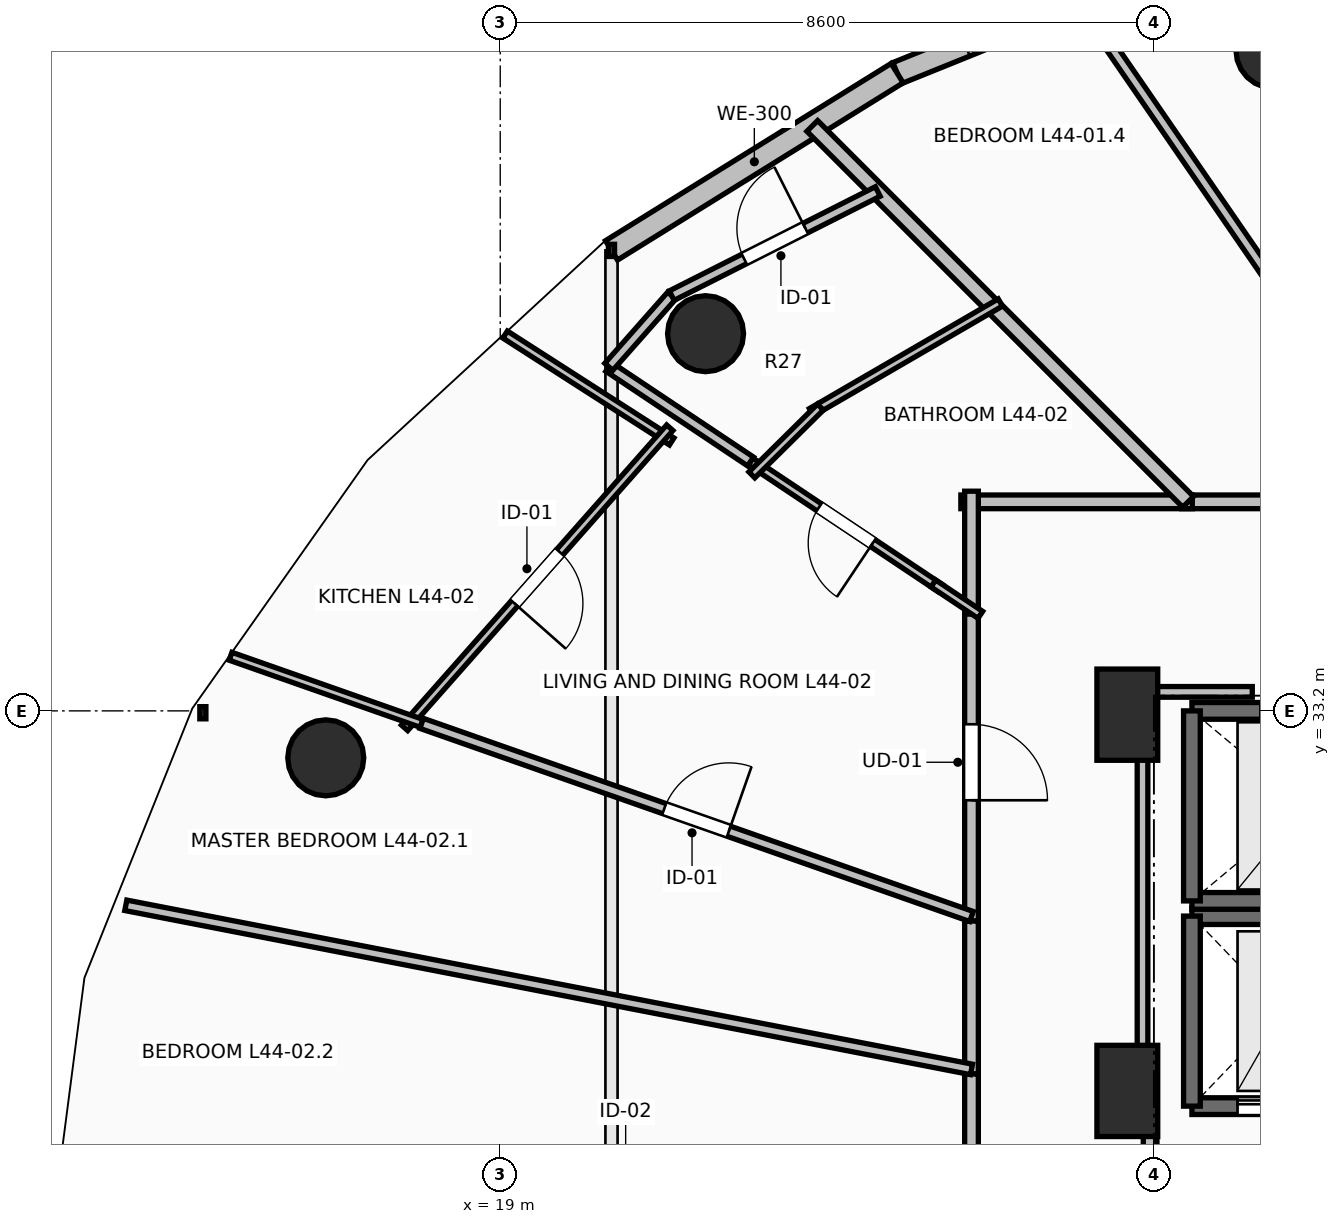
"""IFC4 building model, lengths in metres.
Left out: names, types, materials, properties, quantities, classifications, styles, units other than length and angle.
Written with IfcOpenShell. Run it as: python <this file> out.ifc"""

import sys

from ifc_helpers import new_model, si_unit, direction, frame, frame_2d, origin, origin_2d, place, context, subcontext, project, spatial, rectangle, circle, extrude, element, fill, save


model = new_model("IFC4")
c1 = context("Model", 3, precision=1e-05, world=origin(), true_north=direction((0.0, 1.0)))
c2 = subcontext(c1, "Body", "Model", "MODEL_VIEW")
j1 = project(units=[si_unit("LENGTHUNIT", "METRE"), si_unit("PLANEANGLEUNIT", "RADIAN")], contexts=[c1])
p1 = place(None, origin())
s1 = spatial("IfcSite", under=j1, at=p1, CompositionType="ELEMENT")
p2 = place(p1, origin())
s2 = spatial("IfcBuilding", under=s1, at=p2, CompositionType="ELEMENT")
p3 = place(p2, frame((0.0, 0.0, 164.1)))
s3 = spatial("IfcBuildingStorey", under=s2, at=p3, CompositionType="ELEMENT", Elevation=164.1)
for number, where, z_axis, x_axis in (
    (1, (29.179, 41.891, 0.0), (0.0, 0.0, 1.0), (-0.383, 0.924, 0.0)),
    (2, (21.701, 38.162, 0.0), (0.0, 0.0, 1.0), (-0.707, 0.707, 0.0)),
    (3, (16.705, 32.582, 0.0), (0.0, 0.0, 1.0), (-0.924, 0.383, 0.0)),
):
    element("IfcColumn", number, at=place(p3, frame(where, z_axis=z_axis, x_axis=x_axis)), inside=s3, PredefinedType="COLUMN", context=c2, shape_type="SweptSolid", body=[
        extrude(circle(Radius=0.5, at=origin_2d()), origin(), (0.0, 0.0, 1.0), 3.5),
    ])
for number, where, z_axis, x_axis in (
    (4, (27.25, 28.2, 0.0), (0.0, 0.0, 1.0), (1.0, 0.0, 0.0)),
    (5, (27.25, 33.15, 0.0), (0.0, 0.0, 1.0), (1.0, 0.0, 0.0)),
):
    element("IfcColumn", number, at=place(p3, frame(where, z_axis=z_axis, x_axis=x_axis)), inside=s3, PredefinedType="PILASTER", context=c2, shape_type="SweptSolid", body=[
        extrude(rectangle(XDim=0.8, YDim=1.2, at=origin_2d()), origin(), (0.0, 0.0, 1.0), 3.5),
    ])
p4 = place(p3, frame((28.51, 43.323, 0.0), z_axis=(0.0, 0.0, 1.0), x_axis=(-0.927156504392, -0.374674280359, 0.0)))
e6 = element("IfcWall", 6, at=p4, inside=s3, PredefinedType="STANDARD", context=c2, shape_type="SweptSolid", body=[
    extrude(rectangle(XDim=4.625, YDim=0.3, at=frame_2d((2.312, 0.0))), origin(), (0.0, 0.0, 1.0), 3.24),
])
p5 = place(p4, frame((0.437, 0.0, 0.85)))
e7 = element("IfcOpeningElement", 7, at=p5, cuts=e6, PredefinedType="OPENING", context=c2, shape_type="SweptSolid", body=[
    extrude(rectangle(XDim=1.2, YDim=1.95, at=frame_2d((0.6, 0.975))), frame((0.0, 0.165, 0.0), z_axis=(0.0, -1.0, 0.0), x_axis=(1.0, 0.0, 0.0)), (0.0, 0.0, 1.0), 0.33),
])
p6 = place(p4, frame((2.454, 0.0, 0.85)))
e8 = element("IfcOpeningElement", 8, at=p6, cuts=e6, PredefinedType="OPENING", context=c2, shape_type="SweptSolid", body=[
    extrude(rectangle(XDim=1.2, YDim=1.95, at=frame_2d((0.6, 0.975))), frame((0.0, 0.165, 0.0), z_axis=(0.0, -1.0, 0.0), x_axis=(1.0, 0.0, 0.0)), (0.0, 0.0, 1.0), 0.33),
])
p7 = place(p3, frame((24.222, 41.59, 0.0), z_axis=(0.0, 0.0, 1.0), x_axis=(-0.849721181976, -0.527232313977, 0.0)))
e9 = element("IfcWall", 9, at=p7, inside=s3, PredefinedType="STANDARD", context=c2, shape_type="SweptSolid", body=[
    extrude(rectangle(XDim=4.423, YDim=0.3, at=frame_2d((2.211, 0.0))), origin(), (0.0, 0.0, 1.0), 3.24),
])
p8 = place(p3, frame((28.1, 28.0, 0.0), z_axis=(0.0, 0.0, 1.0), x_axis=(1.0, 0.0, 0.0)))
e10 = element("IfcWall", 10, at=p8, inside=s3, PredefinedType="SHEAR", context=c2, shape_type="SweptSolid", body=[
    extrude(rectangle(XDim=2.4, YDim=0.22, at=frame_2d((1.2, 0.0))), origin(), (0.0, 0.0, 1.0), 3.24),
])
p9 = place(p8, frame((0.6, 0.0, 0.0)))
e11 = element("IfcOpeningElement", 11, at=p9, cuts=e10, PredefinedType="OPENING", context=c2, shape_type="SweptSolid", body=[
    extrude(rectangle(XDim=1.2, YDim=2.2, at=frame_2d((0.6, 1.1))), frame((0.0, 0.125, 0.0), z_axis=(0.0, -1.0, 0.0), x_axis=(1.0, 0.0, 0.0)), (0.0, 0.0, 1.0), 0.25),
])
p10 = place(p3, frame((30.5, 30.5, 0.0), z_axis=(0.0, 0.0, 1.0), x_axis=(-1.0, 0.0, 0.0)))
e12 = element("IfcWall", 12, at=p10, inside=s3, PredefinedType="SHEAR", context=c2, shape_type="SweptSolid", body=[
    extrude(rectangle(XDim=2.4, YDim=0.22, at=frame_2d((1.2, 0.0))), origin(), (0.0, 0.0, 1.0), 3.24),
])
p11 = place(p3, frame((28.1, 30.5, 0.0), z_axis=(0.0, 0.0, 1.0), x_axis=(0.0, -1.0, 0.0)))
e13 = element("IfcWall", 13, at=p11, inside=s3, PredefinedType="SHEAR", context=c2, shape_type="SweptSolid", body=[
    extrude(rectangle(XDim=2.5, YDim=0.22, at=frame_2d((1.25, 0.0))), origin(), (0.0, 0.0, 1.0), 3.24),
])
p12 = place(p3, frame((28.1, 30.7, 0.0), z_axis=(0.0, 0.0, 1.0), x_axis=(1.0, 0.0, 0.0)))
e14 = element("IfcWall", 14, at=p12, inside=s3, PredefinedType="SOLIDWALL", context=c2, shape_type="SweptSolid", body=[
    extrude(rectangle(XDim=3.0, YDim=0.22, at=frame_2d((1.5, 0.0))), origin(), (0.0, 0.0, 1.0), 3.24),
])
p13 = place(p3, frame((31.1, 33.2, 0.0), z_axis=(0.0, 0.0, 1.0), x_axis=(-1.0, 0.0, 0.0)))
e15 = element("IfcWall", 15, at=p13, inside=s3, PredefinedType="SOLIDWALL", context=c2, shape_type="SweptSolid", body=[
    extrude(rectangle(XDim=3.0, YDim=0.22, at=frame_2d((1.5, 0.0))), origin(), (0.0, 0.0, 1.0), 3.24),
])
p14 = place(p13, frame((0.9, 0.0, 0.0)))
e16 = element("IfcOpeningElement", 16, at=p14, cuts=e15, PredefinedType="OPENING", context=c2, shape_type="SweptSolid", body=[
    extrude(rectangle(XDim=1.2, YDim=2.2, at=frame_2d((0.6, 1.1))), frame((0.0, 0.125, 0.0), z_axis=(0.0, -1.0, 0.0), x_axis=(1.0, 0.0, 0.0)), (0.0, 0.0, 1.0), 0.25),
])
p15 = place(p3, frame((28.1, 33.2, 0.0), z_axis=(0.0, 0.0, 1.0), x_axis=(0.0, -1.0, 0.0)))
e17 = element("IfcWall", 17, at=p15, inside=s3, PredefinedType="SOLIDWALL", context=c2, shape_type="SweptSolid", body=[
    extrude(rectangle(XDim=2.5, YDim=0.22, at=frame_2d((1.25, 0.0))), origin(), (0.0, 0.0, 1.0), 3.24),
])
p16 = place(p3, frame((27.55, 28.0, 0.0), z_axis=(0.0, 0.0, 1.0), x_axis=(0.0, -1.0, 0.0)))
e18 = element("IfcWall", 18, at=p16, inside=s3, PredefinedType="PARTITIONING", context=c2, shape_type="SweptSolid", body=[
    extrude(rectangle(XDim=4.05, YDim=0.18, at=frame_2d((2.025, 0.0))), origin(), (0.0, 0.0, 1.0), 3.24),
])
p17 = place(p16, frame((1.425, 0.0, 0.0)))
e19 = element("IfcOpeningElement", 19, at=p17, cuts=e18, PredefinedType="OPENING", context=c2, shape_type="SweptSolid", body=[
    extrude(rectangle(XDim=1.2, YDim=2.15, at=frame_2d((0.6, 1.075))), frame((0.0, 0.105, 0.0), z_axis=(0.0, -1.0, 0.0), x_axis=(1.0, 0.0, 0.0)), (0.0, 0.0, 1.0), 0.21),
])
p18 = place(p3, frame((31.079, 35.95, 0.0), z_axis=(0.0, 0.0, 1.0), x_axis=(-1.0, 0.0, 0.0)))
e20 = element("IfcWall", 20, at=p18, inside=s3, PredefinedType="PARTITIONING", context=c2, shape_type="SweptSolid", body=[
    extrude(rectangle(XDim=3.114, YDim=0.18, at=frame_2d((1.557, 0.0))), origin(), (0.0, 0.0, 1.0), 2.432),
])
p19 = place(p18, frame((1.132, 0.0, 0.0)))
e21 = element("IfcOpeningElement", 21, at=p19, cuts=e20, PredefinedType="OPENING", context=c2, shape_type="SweptSolid", body=[
    extrude(rectangle(XDim=0.85, YDim=2.1, at=frame_2d((0.425, 1.05))), frame((0.0, 0.105, 0.0), z_axis=(0.0, -1.0, 0.0), x_axis=(1.0, 0.0, 0.0)), (0.0, 0.0, 1.0), 0.21),
])
p20 = place(p3, frame((25.2, 34.613, 0.0), z_axis=(0.0, 0.0, 1.0), x_axis=(0.0, -1.0, 0.0)))
e22 = element("IfcWall", 22, at=p20, inside=s3, PredefinedType="PARTITIONING", context=c2, shape_type="SweptSolid", body=[
    extrude(rectangle(XDim=4.178, YDim=0.18, at=frame_2d((2.089, 0.0))), origin(), (0.0, 0.0, 1.0), 2.929),
])
p21 = place(p20, frame((1.589, 0.0, 0.0)))
e23 = element("IfcOpeningElement", 23, at=p21, cuts=e22, PredefinedType="OPENING", context=c2, shape_type="SweptSolid", body=[
    extrude(rectangle(XDim=1.0, YDim=2.15, at=frame_2d((0.5, 1.075))), frame((0.0, 0.105, 0.0), z_axis=(0.0, -1.0, 0.0), x_axis=(1.0, 0.0, 0.0)), (0.0, 0.0, 1.0), 0.21),
])
p22 = place(p3, frame((28.105, 35.95, 0.0), z_axis=(0.0, 0.0, 1.0), x_axis=(-1.0, 0.0, 0.0)))
e24 = element("IfcWall", 24, at=p22, inside=s3, PredefinedType="PARTITIONING", context=c2, shape_type="SweptSolid", body=[
    extrude(rectangle(XDim=3.045, YDim=0.18, at=frame_2d((1.522, 0.0))), origin(), (0.0, 0.0, 1.0), 2.432),
])
p23 = place(p3, frame((25.2, 36.09, 0.0), z_axis=(0.0, 0.0, 1.0), x_axis=(0.0, -1.0, 0.0)))
e25 = element("IfcWall", 25, at=p23, inside=s3, PredefinedType="PARTITIONING", context=c2, shape_type="SweptSolid", body=[
    extrude(rectangle(XDim=1.617, YDim=0.18, at=frame_2d((0.809, 0.0))), origin(), (0.0, 0.0, 1.0), 2.432),
])
p24 = place(p3, frame((25.2, 30.435, 0.0), z_axis=(0.0, 0.0, 1.0), x_axis=(0.0, -1.0, 0.0)))
e26 = element("IfcWall", 26, at=p24, inside=s3, PredefinedType="PARTITIONING", context=c2, shape_type="SweptSolid", body=[
    extrude(rectangle(XDim=2.012, YDim=0.18, at=frame_2d((1.006, 0.0))), origin(), (0.0, 0.0, 1.0), 2.432),
])
p25 = place(p3, frame((25.2, 28.423, 0.0), z_axis=(0.0, 0.0, 1.0), x_axis=(0.0, -1.0, 0.0)))
e27 = element("IfcWall", 27, at=p25, inside=s3, PredefinedType="PARTITIONING", context=c2, shape_type="SweptSolid", body=[
    extrude(rectangle(XDim=1.173, YDim=0.18, at=frame_2d((0.586, 0.0))), origin(), (0.0, 0.0, 1.0), 2.432),
])
p26 = place(p3, frame((26.608, 42.553, 0.0), z_axis=(0.0, 0.0, 1.0), x_axis=(0.566919141794, -0.823773443774, 0.0)))
e28 = element("IfcWall", 28, at=p26, inside=s3, PredefinedType="PARTITIONING", context=c2, shape_type="SweptSolid", body=[
    extrude(rectangle(XDim=8.016, YDim=0.14, at=frame_2d((4.008, 0.0))), origin(), (0.0, 0.0, 1.0), 2.432),
])
p27 = place(p3, frame((23.105, 40.895, 0.0), z_axis=(0.0, 0.0, 1.0), x_axis=(0.707106781187, -0.707106781187, 0.0)))
e29 = element("IfcWall", 29, at=p27, inside=s3, PredefinedType="PARTITIONING", context=c2, shape_type="SweptSolid", body=[
    extrude(rectangle(XDim=6.993, YDim=0.2, at=frame_2d((3.497, 0.0))), origin(), (0.0, 0.0, 1.0), 2.432),
])
p28 = place(p3, frame((24.79, 34.815, 0.0), z_axis=(0.0, 0.0, 1.0), x_axis=(-0.831749793219, 0.555150683581, 0.0)))
e30 = element("IfcWall", 30, at=p28, inside=s3, PredefinedType="PARTITIONING", context=c2, shape_type="SweptSolid", body=[
    extrude(rectangle(XDim=3.001, YDim=0.11, at=frame_2d((1.5, 0.0))), origin(), (0.0, 0.0, 1.0), 2.886),
])
p29 = place(p28, frame((1.068, 0.0, 0.0)))
e31 = element("IfcOpeningElement", 31, at=p29, cuts=e30, PredefinedType="OPENING", context=c2, shape_type="SweptSolid", body=[
    extrude(rectangle(XDim=0.85, YDim=2.1, at=frame_2d((0.425, 1.05))), frame((0.0, 0.07, 0.0), z_axis=(0.0, -1.0, 0.0), x_axis=(1.0, 0.0, 0.0)), (0.0, 0.0, 1.0), 0.14),
])
p30 = place(p3, frame((25.316, 34.463, 0.0), z_axis=(0.0, 0.0, 1.0), x_axis=(-0.83179740502, 0.555079342979, 0.0)))
e32 = element("IfcWall", 32, at=p30, inside=s3, PredefinedType="PARTITIONING", context=c2, shape_type="SweptSolid", body=[
    extrude(rectangle(XDim=0.743, YDim=0.11, at=frame_2d((0.372, 0.0))), origin(), (0.0, 0.0, 1.0), 2.929),
])
p31 = place(p3, frame((19.064, 38.151, 0.0), z_axis=(0.0, 0.0, 1.0), x_axis=(0.841644233319, -0.540032392104, 0.0)))
e33 = element("IfcWall", 33, at=p31, inside=s3, PredefinedType="PARTITIONING", context=c2, shape_type="SweptSolid", body=[
    extrude(rectangle(XDim=2.604, YDim=0.11, at=frame_2d((1.302, 0.0))), origin(), (0.0, 0.0, 1.0), 2.728),
])
p32 = place(p3, frame((21.231, 36.925, 0.0), z_axis=(0.0, 0.0, 1.0), x_axis=(-0.662281895209, -0.749254757261, 0.0)))
e34 = element("IfcWall", 34, at=p32, inside=s3, PredefinedType="PARTITIONING", context=c2, shape_type="SweptSolid", body=[
    extrude(rectangle(XDim=5.269, YDim=0.11, at=frame_2d((2.634, 0.0))), origin(), (0.0, 0.0, 1.0), 3.24),
])
p33 = place(p32, frame((2.184, 0.0, 0.0)))
e35 = element("IfcOpeningElement", 35, at=p33, cuts=e34, PredefinedType="OPENING", context=c2, shape_type="SweptSolid", body=[
    extrude(rectangle(XDim=0.9, YDim=2.1, at=frame_2d((0.45, 1.05))), frame((0.0, 0.07, 0.0), z_axis=(0.0, -1.0, 0.0), x_axis=(1.0, 0.0, 0.0)), (0.0, 0.0, 1.0), 0.14),
])
p34 = place(p3, frame((17.966, 33.036, 0.0), z_axis=(0.0, 0.0, 1.0), x_axis=(-0.943523626292, 0.331305246909, 0.0)))
e36 = element("IfcWall", 36, at=p34, inside=s3, PredefinedType="PARTITIONING", context=c2, shape_type="SweptSolid", body=[
    extrude(rectangle(XDim=2.665, YDim=0.11, at=frame_2d((1.332, 0.0))), origin(), (0.0, 0.0, 1.0), 2.728),
])
p35 = place(p3, frame((22.294, 36.481, 0.0), z_axis=(0.0, 0.0, 1.0), x_axis=(-0.831732018696, 0.555177313186, 0.0)))
e37 = element("IfcWall", 37, at=p35, inside=s3, PredefinedType="PARTITIONING", context=c2, shape_type="SweptSolid", body=[
    extrude(rectangle(XDim=2.243, YDim=0.14, at=frame_2d((1.122, 0.0))), origin(), (0.0, 0.0, 1.0), 2.728),
])
p36 = place(p3, frame((20.428, 37.726, 0.0), z_axis=(0.0, 0.0, 1.0), x_axis=(0.662228388064, 0.749302049938, 0.0)))
e38 = element("IfcWall", 38, at=p36, inside=s3, PredefinedType="PARTITIONING", context=c2, shape_type="SweptSolid", body=[
    extrude(rectangle(XDim=1.25, YDim=0.14, at=frame_2d((0.625, 0.0))), origin(), (0.0, 0.0, 1.0), 3.24),
])
p37 = place(p3, frame((21.256, 38.663, 0.0), z_axis=(0.0, 0.0, 1.0), x_axis=(0.892522213595, 0.451003434842, 0.0)))
e39 = element("IfcWall", 39, at=p37, inside=s3, PredefinedType="PARTITIONING", context=c2, shape_type="SweptSolid", body=[
    extrude(rectangle(XDim=3.037, YDim=0.14, at=frame_2d((1.519, 0.0))), origin(), (0.0, 0.0, 1.0), 3.24),
])
p38 = place(p37, frame((1.069, 0.0, 0.0)))
e40 = element("IfcOpeningElement", 40, at=p38, cuts=e39, PredefinedType="OPENING", context=c2, shape_type="SweptSolid", body=[
    extrude(rectangle(XDim=0.9, YDim=2.1, at=frame_2d((0.45, 1.05))), frame((0.0, 0.085, 0.0), z_axis=(0.0, -1.0, 0.0), x_axis=(1.0, 0.0, 0.0)), (0.0, 0.0, 1.0), 0.17),
])
p39 = place(p3, frame((17.966, 33.035, 0.0), z_axis=(0.0, 0.0, 1.0), x_axis=(0.943515303593, -0.331328948157, 0.0)))
e41 = element("IfcWall", 41, at=p39, inside=s3, PredefinedType="PARTITIONING", context=c2, shape_type="SweptSolid", body=[
    extrude(rectangle(XDim=7.667, YDim=0.14, at=frame_2d((3.833, 0.0))), origin(), (0.0, 0.0, 1.0), 2.886),
])
p40 = place(p39, frame((3.384, 0.0, 0.0)))
e42 = element("IfcOpeningElement", 42, at=p40, cuts=e41, PredefinedType="OPENING", context=c2, shape_type="SweptSolid", body=[
    extrude(rectangle(XDim=0.9, YDim=2.1, at=frame_2d((0.45, 1.05))), frame((0.0, 0.085, 0.0), z_axis=(0.0, -1.0, 0.0), x_axis=(1.0, 0.0, 0.0)), (0.0, 0.0, 1.0), 0.17),
])
p41 = place(p3, frame((25.579, 38.572, 0.0), z_axis=(0.0, 0.0, 1.0), x_axis=(-0.864754420197, -0.502194974835, 0.0)))
e43 = element("IfcWall", 43, at=p41, inside=s3, PredefinedType="PARTITIONING", context=c2, shape_type="SweptSolid", body=[
    extrude(rectangle(XDim=2.873, YDim=0.11, at=frame_2d((1.436, 0.0))), origin(), (0.0, 0.0, 1.0), 2.432),
])
p42 = place(p3, frame((23.213, 37.197, 0.0), z_axis=(0.0, 0.0, 1.0), x_axis=(-0.711040657556, -0.703150896538, 0.0)))
e44 = element("IfcWall", 44, at=p42, inside=s3, PredefinedType="PARTITIONING", context=c2, shape_type="SweptSolid", body=[
    extrude(rectangle(XDim=1.269, YDim=0.11, at=frame_2d((0.634, 0.0))), origin(), (0.0, 0.0, 1.0), 2.432),
])
p43 = place(p3, frame((14.074, 30.642, 0.0), z_axis=(0.0, 0.0, 1.0), x_axis=(0.981684833641, -0.190512171261, 0.0)))
e45 = element("IfcWall", 45, at=p43, inside=s3, PredefinedType="PARTITIONING", context=c2, shape_type="SweptSolid", body=[
    extrude(rectangle(XDim=11.333, YDim=0.14, at=frame_2d((5.667, 0.0))), origin(), (0.0, 0.0, 1.0), 2.728),
])
p44 = place(p3, frame((28.894, 33.45, 0.0), z_axis=(0.0, 0.0, 1.0), x_axis=(-1.0, 0.0, 0.0)))
e46 = element("IfcWall", 46, at=p44, inside=s3, PredefinedType="PARTITIONING", context=c2, shape_type="SweptSolid", body=[
    extrude(rectangle(XDim=1.444, YDim=0.14, at=frame_2d((0.722, 0.0))), origin(), (0.0, 0.0, 1.0), 2.432),
])
p45 = place(p3, frame((27.45, 33.45, 0.0), z_axis=(0.0, 0.0, 1.0), x_axis=(0.0, -1.0, 0.0)))
e47 = element("IfcWall", 47, at=p45, inside=s3, PredefinedType="PARTITIONING", context=c2, shape_type="SweptSolid", body=[
    extrude(rectangle(XDim=5.254, YDim=0.14, at=frame_2d((2.627, 0.0))), origin(), (0.0, 0.0, 1.0), 2.432),
])
p46 = place(p9, origin())
e48 = element("IfcDoor", 48, at=p46, inside=s3, OperationType="SLIDING_TO_LEFT", PredefinedType="DOOR", context=c2, shape_type="SweptSolid", body=[
    extrude(rectangle(XDim=1.2, YDim=2.2, at=frame_2d((0.6, 1.1))), frame((0.0, 0.025, 0.0), z_axis=(0.0, -1.0, 0.0), x_axis=(1.0, 0.0, 0.0)), (0.0, 0.0, 1.0), 0.05),
])
fill(e11, e48)
p47 = place(p14, origin())
e49 = element("IfcDoor", 49, at=p47, inside=s3, OperationType="SLIDING_TO_LEFT", PredefinedType="DOOR", context=c2, shape_type="SweptSolid", body=[
    extrude(rectangle(XDim=1.2, YDim=2.2, at=frame_2d((0.6, 1.1))), frame((0.0, 0.025, 0.0), z_axis=(0.0, -1.0, 0.0), x_axis=(1.0, 0.0, 0.0)), (0.0, 0.0, 1.0), 0.05),
])
fill(e16, e49)
p48 = place(p21, origin())
e50 = element("IfcDoor", 50, at=p48, inside=s3, OperationType="SINGLE_SWING_RIGHT", PredefinedType="DOOR", context=c2, shape_type="SweptSolid", body=[
    extrude(rectangle(XDim=1.0, YDim=2.15, at=frame_2d((0.5, 1.075))), frame((0.0, 0.025, 0.0), z_axis=(0.0, -1.0, 0.0), x_axis=(1.0, 0.0, 0.0)), (0.0, 0.0, 1.0), 0.05),
])
fill(e23, e50)
p49 = place(p29, origin())
e51 = element("IfcDoor", 51, at=p49, inside=s3, OperationType="SINGLE_SWING_LEFT", PredefinedType="DOOR", context=c2, shape_type="SweptSolid", body=[
    extrude(rectangle(XDim=0.85, YDim=2.1, at=frame_2d((0.425, 1.05))), frame((0.0, 0.025, 0.0), z_axis=(0.0, -1.0, 0.0), x_axis=(1.0, 0.0, 0.0)), (0.0, 0.0, 1.0), 0.05),
])
fill(e31, e51)
p50 = place(p33, origin())
e52 = element("IfcDoor", 52, at=p50, inside=s3, OperationType="SINGLE_SWING_RIGHT", PredefinedType="DOOR", context=c2, shape_type="SweptSolid", body=[
    extrude(rectangle(XDim=0.9, YDim=2.1, at=frame_2d((0.45, 1.05))), frame((0.0, 0.025, 0.0), z_axis=(0.0, -1.0, 0.0), x_axis=(1.0, 0.0, 0.0)), (0.0, 0.0, 1.0), 0.05),
])
fill(e35, e52)
p51 = place(p38, origin())
e53 = element("IfcDoor", 53, at=p51, inside=s3, OperationType="SINGLE_SWING_RIGHT", PredefinedType="DOOR", context=c2, shape_type="SweptSolid", body=[
    extrude(rectangle(XDim=0.9, YDim=2.1, at=frame_2d((0.45, 1.05))), frame((0.0, 0.025, 0.0), z_axis=(0.0, -1.0, 0.0), x_axis=(1.0, 0.0, 0.0)), (0.0, 0.0, 1.0), 0.05),
])
fill(e40, e53)
p52 = place(p40, origin())
e54 = element("IfcDoor", 54, at=p52, inside=s3, OperationType="SINGLE_SWING_RIGHT", PredefinedType="DOOR", context=c2, shape_type="SweptSolid", body=[
    extrude(rectangle(XDim=0.9, YDim=2.1, at=frame_2d((0.45, 1.05))), frame((0.0, 0.025, 0.0), z_axis=(0.0, -1.0, 0.0), x_axis=(1.0, 0.0, 0.0)), (0.0, 0.0, 1.0), 0.05),
])
fill(e42, e54)
save(model, sys.argv[1])
